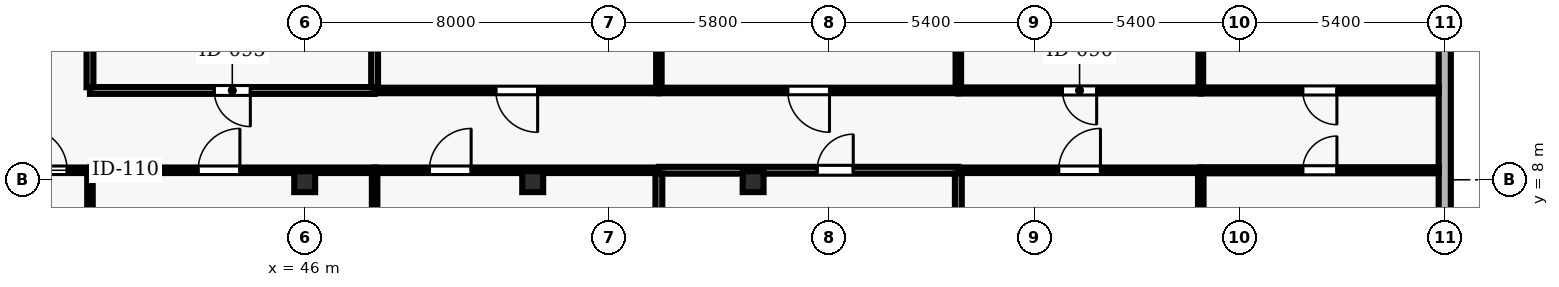
"""IFC4 building model, lengths in metres.
Left out: names, types, materials, properties, quantities, classifications, styles, units other than length and angle.
Written with IfcOpenShell. Run it as: python <this file> out.ifc"""

import sys

from ifc_helpers import new_model, si_unit, direction, frame, frame_2d, origin, origin_2d, place, context, subcontext, project, spatial, rectangle, hollow_rectangle, extrude, element, fill, save


model = new_model("IFC4")
c1 = context("Model", 3, precision=1e-05, world=origin(), true_north=direction((0.0, 1.0)))
c2 = subcontext(c1, "Body", "Model", "MODEL_VIEW")
j1 = project(units=[si_unit("LENGTHUNIT", "METRE"), si_unit("PLANEANGLEUNIT", "RADIAN")], contexts=[c1])
p1 = place(None, origin())
s1 = spatial("IfcSite", under=j1, at=p1, CompositionType="ELEMENT")
p2 = place(p1, origin())
s2 = spatial("IfcBuilding", under=s1, at=p2, CompositionType="ELEMENT")
p3 = place(p2, frame((0.0, 0.0, 62.2)))
s3 = spatial("IfcBuildingStorey", under=s2, at=p3, CompositionType="ELEMENT", Elevation=62.2)
for number, where, z_axis, x_axis in (
    (1, (46.0, 7.95, 0.0), (0.0, 0.0, 1.0), (1.0, 0.0, 0.0)),
    (2, (52.0, 7.95, 0.0), (0.0, 0.0, 1.0), (1.0, 0.0, 0.0)),
    (3, (57.8, 7.95, 0.0), (0.0, 0.0, 1.0), (1.0, 0.0, 0.0)),
):
    element("IfcColumn", number, at=place(p3, frame(where, z_axis=z_axis, x_axis=x_axis)), inside=s3, PredefinedType="COLUMN", context=c2, shape_type="SweptSolid", body=[
        extrude(hollow_rectangle(XDim=0.55, YDim=0.55, WallThickness=0.025, at=origin_2d()), origin(), (0.0, 0.0, 1.0), 3.9),
    ])
p4 = place(p3, frame((76.0, 2.5, 0.0), z_axis=(0.0, 0.0, 1.0), x_axis=(0.0, 1.0, 0.0)))
e4 = element("IfcWall", 4, at=p4, inside=s3, PredefinedType="SOLIDWALL", context=c2, shape_type="SweptSolid", body=[
    extrude(rectangle(XDim=11.0, YDim=0.32, at=frame_2d((5.5, 0.0))), origin(), (0.0, 0.0, 1.0), 3.69),
])
p5 = place(p4, frame((1.55, 0.0, 0.9)))
e5 = element("IfcOpeningElement", 5, at=p5, cuts=e4, PredefinedType="OPENING", context=c2, shape_type="SweptSolid", body=[
    extrude(rectangle(XDim=2.4, YDim=1.6, at=frame_2d((1.2, 0.8))), frame((0.0, 0.17, 0.0), z_axis=(0.0, -1.0, 0.0), x_axis=(1.0, 0.0, 0.0)), (0.0, 0.0, 1.0), 0.34),
])
p6 = place(p3, frame((38.05, 8.25, 0.0), z_axis=(0.0, 0.0, 1.0), x_axis=(1.0, 0.0, 0.0)))
e6 = element("IfcWall", 6, at=p6, inside=s3, PredefinedType="PARTITIONING", context=c2, shape_type="SweptSolid", body=[
    extrude(rectangle(XDim=2.3, YDim=0.145, at=frame_2d((1.15, 0.0))), origin(), (0.0, 0.0, 1.0), 2.995),
])
p7 = place(p6, frame((0.6, 0.0, 0.0)))
e7 = element("IfcOpeningElement", 7, at=p7, cuts=e6, PredefinedType="OPENING", context=c2, shape_type="SweptSolid", body=[
    extrude(rectangle(XDim=1.1, YDim=2.15, at=frame_2d((0.55, 1.075))), frame((0.0, 0.083, 0.0), z_axis=(0.0, -1.0, 0.0), x_axis=(1.0, 0.0, 0.0)), (0.0, 0.0, 1.0), 0.165),
])
p8 = place(p3, frame((40.35, 8.25, 0.0), z_axis=(0.0, 0.0, 1.0), x_axis=(1.0, 0.0, 0.0)))
e8 = element("IfcWall", 8, at=p8, inside=s3, PredefinedType="PARTITIONING", context=c2, shape_type="SweptSolid", body=[
    extrude(rectangle(XDim=7.49, YDim=0.145, at=frame_2d((3.745, 0.0))), origin(), (0.0, 0.0, 1.0), 2.995),
])
p9 = place(p8, frame((2.845, 0.0, 0.0)))
e9 = element("IfcOpeningElement", 9, at=p9, cuts=e8, PredefinedType="OPENING", context=c2, shape_type="SweptSolid", body=[
    extrude(rectangle(XDim=1.1, YDim=2.15, at=frame_2d((0.55, 1.075))), frame((0.0, 0.083, 0.0), z_axis=(0.0, -1.0, 0.0), x_axis=(1.0, 0.0, 0.0)), (0.0, 0.0, 1.0), 0.165),
])
p10 = place(p3, frame((47.84, 8.25, 0.0), z_axis=(0.0, 0.0, 1.0), x_axis=(1.0, 0.0, 0.0)))
e10 = element("IfcWall", 10, at=p10, inside=s3, PredefinedType="PARTITIONING", context=c2, shape_type="SweptSolid", body=[
    extrude(rectangle(XDim=7.48, YDim=0.145, at=frame_2d((3.74, 0.0))), origin(), (0.0, 0.0, 1.0), 2.995),
])
p11 = place(p10, frame((1.44, 0.0, 0.0)))
e11 = element("IfcOpeningElement", 11, at=p11, cuts=e10, PredefinedType="OPENING", context=c2, shape_type="SweptSolid", body=[
    extrude(rectangle(XDim=1.1, YDim=2.15, at=frame_2d((0.55, 1.075))), frame((0.0, 0.083, 0.0), z_axis=(0.0, -1.0, 0.0), x_axis=(1.0, 0.0, 0.0)), (0.0, 0.0, 1.0), 0.165),
])
p12 = place(p3, frame((47.84, 10.35, 0.0), z_axis=(0.0, 0.0, 1.0), x_axis=(-1.0, 0.0, 0.0)))
e12 = element("IfcWall", 12, at=p12, inside=s3, PredefinedType="PARTITIONING", context=c2, shape_type="SweptSolid", body=[
    extrude(rectangle(XDim=7.49, YDim=0.18, at=frame_2d((3.745, 0.0))), origin(), (0.0, 0.0, 1.0), 3.227),
])
p13 = place(p12, frame((3.27, 0.0, 0.0)))
e13 = element("IfcOpeningElement", 13, at=p13, cuts=e12, PredefinedType="OPENING", context=c2, shape_type="SweptSolid", body=[
    extrude(rectangle(XDim=0.95, YDim=2.1, at=frame_2d((0.475, 1.05))), frame((0.0, 0.1, 0.0), z_axis=(0.0, -1.0, 0.0), x_axis=(1.0, 0.0, 0.0)), (0.0, 0.0, 1.0), 0.2),
])
p14 = place(p3, frame((55.32, 8.25, 0.0), z_axis=(0.0, 0.0, 1.0), x_axis=(1.0, 0.0, 0.0)))
e14 = element("IfcWall", 14, at=p14, inside=s3, PredefinedType="PARTITIONING", context=c2, shape_type="SweptSolid", body=[
    extrude(rectangle(XDim=7.88, YDim=0.18, at=frame_2d((3.94, 0.0))), origin(), (0.0, 0.0, 1.0), 2.995),
])
p15 = place(p14, frame((4.165, 0.0, 0.0)))
e15 = element("IfcOpeningElement", 15, at=p15, cuts=e14, PredefinedType="OPENING", context=c2, shape_type="SweptSolid", body=[
    extrude(rectangle(XDim=0.95, YDim=2.1, at=frame_2d((0.475, 1.05))), frame((0.0, 0.1, 0.0), z_axis=(0.0, -1.0, 0.0), x_axis=(1.0, 0.0, 0.0)), (0.0, 0.0, 1.0), 0.2),
])
p16 = place(p3, frame((55.32, 10.35, 0.0), z_axis=(0.0, 0.0, 1.0), x_axis=(-1.0, 0.0, 0.0)))
e16 = element("IfcWall", 16, at=p16, inside=s3, PredefinedType="PARTITIONING", context=c2, shape_type="SweptSolid", body=[
    extrude(rectangle(XDim=7.48, YDim=0.145, at=frame_2d((3.74, 0.0))), origin(), (0.0, 0.0, 1.0), 3.227),
])
p17 = place(p16, frame((3.19, 0.0, 0.0)))
e17 = element("IfcOpeningElement", 17, at=p17, cuts=e16, PredefinedType="OPENING", context=c2, shape_type="SweptSolid", body=[
    extrude(rectangle(XDim=1.1, YDim=2.15, at=frame_2d((0.55, 1.075))), frame((0.0, 0.083, 0.0), z_axis=(0.0, -1.0, 0.0), x_axis=(1.0, 0.0, 0.0)), (0.0, 0.0, 1.0), 0.165),
])
p18 = place(p3, frame((63.2, 8.25, 0.0), z_axis=(0.0, 0.0, 1.0), x_axis=(1.0, 0.0, 0.0)))
e18 = element("IfcWall", 18, at=p18, inside=s3, PredefinedType="PARTITIONING", context=c2, shape_type="SweptSolid", body=[
    extrude(rectangle(XDim=6.38, YDim=0.145, at=frame_2d((3.19, 0.0))), origin(), (0.0, 0.0, 1.0), 3.69),
])
p19 = place(p18, frame((2.64, 0.0, 0.0)))
e19 = element("IfcOpeningElement", 19, at=p19, cuts=e18, PredefinedType="OPENING", context=c2, shape_type="SweptSolid", body=[
    extrude(rectangle(XDim=1.1, YDim=2.15, at=frame_2d((0.55, 1.075))), frame((0.0, 0.083, 0.0), z_axis=(0.0, -1.0, 0.0), x_axis=(1.0, 0.0, 0.0)), (0.0, 0.0, 1.0), 0.165),
])
p20 = place(p3, frame((63.2, 10.35, 0.0), z_axis=(0.0, 0.0, 1.0), x_axis=(-1.0, 0.0, 0.0)))
e20 = element("IfcWall", 20, at=p20, inside=s3, PredefinedType="PARTITIONING", context=c2, shape_type="SweptSolid", body=[
    extrude(rectangle(XDim=7.88, YDim=0.145, at=frame_2d((3.94, 0.0))), origin(), (0.0, 0.0, 1.0), 3.227),
])
p21 = place(p20, frame((3.39, 0.0, 0.0)))
e21 = element("IfcOpeningElement", 21, at=p21, cuts=e20, PredefinedType="OPENING", context=c2, shape_type="SweptSolid", body=[
    extrude(rectangle(XDim=1.1, YDim=2.15, at=frame_2d((0.55, 1.075))), frame((0.0, 0.083, 0.0), z_axis=(0.0, -1.0, 0.0), x_axis=(1.0, 0.0, 0.0)), (0.0, 0.0, 1.0), 0.165),
])
p22 = place(p3, frame((69.58, 8.25, 0.0), z_axis=(0.0, 0.0, 1.0), x_axis=(1.0, 0.0, 0.0)))
e22 = element("IfcWall", 22, at=p22, inside=s3, PredefinedType="PARTITIONING", context=c2, shape_type="SweptSolid", body=[
    extrude(rectangle(XDim=6.265, YDim=0.16, at=frame_2d((3.132, 0.0))), origin(), (0.0, 0.0, 1.0), 3.69),
])
p23 = place(p22, frame((2.683, 0.0, 0.0)))
e23 = element("IfcOpeningElement", 23, at=p23, cuts=e22, PredefinedType="OPENING", context=c2, shape_type="SweptSolid", body=[
    extrude(rectangle(XDim=0.9, YDim=2.1, at=frame_2d((0.45, 1.05))), frame((0.0, 0.09, 0.0), z_axis=(0.0, -1.0, 0.0), x_axis=(1.0, 0.0, 0.0)), (0.0, 0.0, 1.0), 0.18),
])
p24 = place(p3, frame((69.58, 10.35, 0.0), z_axis=(0.0, 0.0, 1.0), x_axis=(-1.0, 0.0, 0.0)))
e24 = element("IfcWall", 24, at=p24, inside=s3, PredefinedType="PARTITIONING", context=c2, shape_type="SweptSolid", body=[
    extrude(rectangle(XDim=6.38, YDim=0.16, at=frame_2d((3.19, 0.0))), origin(), (0.0, 0.0, 1.0), 3.227),
])
p25 = place(p24, frame((2.74, 0.0, 0.0)))
e25 = element("IfcOpeningElement", 25, at=p25, cuts=e24, PredefinedType="OPENING", context=c2, shape_type="SweptSolid", body=[
    extrude(rectangle(XDim=0.9, YDim=2.1, at=frame_2d((0.45, 1.05))), frame((0.0, 0.09, 0.0), z_axis=(0.0, -1.0, 0.0), x_axis=(1.0, 0.0, 0.0)), (0.0, 0.0, 1.0), 0.18),
])
p26 = place(p3, frame((75.845, 10.35, 0.0), z_axis=(0.0, 0.0, 1.0), x_axis=(-1.0, 0.0, 0.0)))
e26 = element("IfcWall", 26, at=p26, inside=s3, PredefinedType="PARTITIONING", context=c2, shape_type="SweptSolid", body=[
    extrude(rectangle(XDim=6.265, YDim=0.16, at=frame_2d((3.132, 0.0))), origin(), (0.0, 0.0, 1.0), 3.69),
])
p27 = place(p26, frame((2.683, 0.0, 0.0)))
e27 = element("IfcOpeningElement", 27, at=p27, cuts=e26, PredefinedType="OPENING", context=c2, shape_type="SweptSolid", body=[
    extrude(rectangle(XDim=0.9, YDim=2.1, at=frame_2d((0.45, 1.05))), frame((0.0, 0.09, 0.0), z_axis=(0.0, -1.0, 0.0), x_axis=(1.0, 0.0, 0.0)), (0.0, 0.0, 1.0), 0.18),
])
p28 = place(p3, frame((40.35, 0.155, 0.0), z_axis=(0.0, 0.0, 1.0), x_axis=(0.0, 1.0, 0.0)))
e28 = element("IfcWall", 28, at=p28, inside=s3, PredefinedType="PARTITIONING", context=c2, shape_type="SweptSolid", body=[
    extrude(rectangle(XDim=8.027, YDim=0.145, at=frame_2d((4.013, 0.0))), origin(), (0.0, 0.0, 1.0), 3.69),
])
p29 = place(p3, frame((40.35, 10.435, 0.0), z_axis=(0.0, 0.0, 1.0), x_axis=(0.0, 1.0, 0.0)))
e29 = element("IfcWall", 29, at=p29, inside=s3, PredefinedType="PARTITIONING", context=c2, shape_type="SweptSolid", body=[
    extrude(rectangle(XDim=5.48, YDim=0.18, at=frame_2d((2.74, 0.0))), origin(), (0.0, 0.0, 1.0), 3.227),
])
p30 = place(p3, frame((47.84, 0.155, 0.0), z_axis=(0.0, 0.0, 1.0), x_axis=(0.0, 1.0, 0.0)))
e30 = element("IfcWall", 30, at=p30, inside=s3, PredefinedType="PARTITIONING", context=c2, shape_type="SweptSolid", body=[
    extrude(rectangle(XDim=8.027, YDim=0.145, at=frame_2d((4.013, 0.0))), origin(), (0.0, 0.0, 1.0), 3.69),
])
p31 = place(p3, frame((47.84, 10.435, 0.0), z_axis=(0.0, 0.0, 1.0), x_axis=(0.0, 1.0, 0.0)))
e31 = element("IfcWall", 31, at=p31, inside=s3, PredefinedType="PARTITIONING", context=c2, shape_type="SweptSolid", body=[
    extrude(rectangle(XDim=5.48, YDim=0.18, at=frame_2d((2.74, 0.0))), origin(), (0.0, 0.0, 1.0), 3.69),
])
p32 = place(p3, frame((55.32, 0.155, 0.0), z_axis=(0.0, 0.0, 1.0), x_axis=(0.0, 1.0, 0.0)))
e32 = element("IfcWall", 32, at=p32, inside=s3, PredefinedType="PARTITIONING", context=c2, shape_type="SweptSolid", body=[
    extrude(rectangle(XDim=8.01, YDim=0.18, at=frame_2d((4.005, 0.0))), origin(), (0.0, 0.0, 1.0), 3.69),
])
p33 = place(p3, frame((55.32, 10.418, 0.0), z_axis=(0.0, 0.0, 1.0), x_axis=(0.0, 1.0, 0.0)))
e33 = element("IfcWall", 33, at=p33, inside=s3, PredefinedType="PARTITIONING", context=c2, shape_type="SweptSolid", body=[
    extrude(rectangle(XDim=5.427, YDim=0.145, at=frame_2d((2.713, 0.0))), origin(), (0.0, 0.0, 1.0), 3.69),
])
p34 = place(p3, frame((63.2, 0.155, 0.0), z_axis=(0.0, 0.0, 1.0), x_axis=(0.0, 1.0, 0.0)))
e34 = element("IfcWall", 34, at=p34, inside=s3, PredefinedType="PARTITIONING", context=c2, shape_type="SweptSolid", body=[
    extrude(rectangle(XDim=8.01, YDim=0.18, at=frame_2d((4.005, 0.0))), origin(), (0.0, 0.0, 1.0), 2.995),
])
p35 = place(p3, frame((63.2, 10.425, 0.0), z_axis=(0.0, 0.0, 1.0), x_axis=(0.0, 1.0, 0.0)))
e35 = element("IfcWall", 35, at=p35, inside=s3, PredefinedType="PARTITIONING", context=c2, shape_type="SweptSolid", body=[
    extrude(rectangle(XDim=5.42, YDim=0.145, at=frame_2d((2.71, 0.0))), origin(), (0.0, 0.0, 1.0), 2.995),
])
p36 = place(p3, frame((69.58, 0.155, 0.0), z_axis=(0.0, 0.0, 1.0), x_axis=(0.0, 1.0, 0.0)))
e36 = element("IfcWall", 36, at=p36, inside=s3, PredefinedType="PARTITIONING", context=c2, shape_type="SweptSolid", body=[
    extrude(rectangle(XDim=8.02, YDim=0.145, at=frame_2d((4.01, 0.0))), origin(), (0.0, 0.0, 1.0), 3.69),
])
p37 = place(p3, frame((69.58, 10.425, 0.0), z_axis=(0.0, 0.0, 1.0), x_axis=(0.0, 1.0, 0.0)))
e37 = element("IfcWall", 37, at=p37, inside=s3, PredefinedType="PARTITIONING", context=c2, shape_type="SweptSolid", body=[
    extrude(rectangle(XDim=5.42, YDim=0.125, at=frame_2d((2.71, 0.0))), origin(), (0.0, 0.0, 1.0), 3.69),
])
p38 = place(p7, origin())
e38 = element("IfcDoor", 38, at=p38, inside=s3, OperationType="SINGLE_SWING_LEFT", PredefinedType="DOOR", context=c2, shape_type="SweptSolid", body=[
    extrude(rectangle(XDim=1.1, YDim=2.15, at=frame_2d((0.55, 1.075))), frame((0.0, 0.025, 0.0), z_axis=(0.0, -1.0, 0.0), x_axis=(1.0, 0.0, 0.0)), (0.0, 0.0, 1.0), 0.05),
])
fill(e7, e38)
p39 = place(p9, origin())
e39 = element("IfcDoor", 39, at=p39, inside=s3, OperationType="SINGLE_SWING_RIGHT", PredefinedType="DOOR", context=c2, shape_type="SweptSolid", body=[
    extrude(rectangle(XDim=1.1, YDim=2.15, at=frame_2d((0.55, 1.075))), frame((0.0, 0.025, 0.0), z_axis=(0.0, -1.0, 0.0), x_axis=(1.0, 0.0, 0.0)), (0.0, 0.0, 1.0), 0.05),
])
fill(e9, e39)
p40 = place(p13, origin())
e40 = element("IfcDoor", 40, at=p40, inside=s3, OperationType="SINGLE_SWING_LEFT", PredefinedType="DOOR", context=c2, shape_type="SweptSolid", body=[
    extrude(rectangle(XDim=0.95, YDim=2.1, at=frame_2d((0.475, 1.05))), frame((0.0, 0.025, 0.0), z_axis=(0.0, -1.0, 0.0), x_axis=(1.0, 0.0, 0.0)), (0.0, 0.0, 1.0), 0.05),
])
fill(e13, e40)
p41 = place(p11, origin())
e41 = element("IfcDoor", 41, at=p41, inside=s3, OperationType="SINGLE_SWING_RIGHT", PredefinedType="DOOR", context=c2, shape_type="SweptSolid", body=[
    extrude(rectangle(XDim=1.1, YDim=2.15, at=frame_2d((0.55, 1.075))), frame((0.0, 0.025, 0.0), z_axis=(0.0, -1.0, 0.0), x_axis=(1.0, 0.0, 0.0)), (0.0, 0.0, 1.0), 0.05),
])
fill(e11, e41)
p42 = place(p17, origin())
e42 = element("IfcDoor", 42, at=p42, inside=s3, OperationType="SINGLE_SWING_LEFT", PredefinedType="DOOR", context=c2, shape_type="SweptSolid", body=[
    extrude(rectangle(XDim=1.1, YDim=2.15, at=frame_2d((0.55, 1.075))), frame((0.0, 0.025, 0.0), z_axis=(0.0, -1.0, 0.0), x_axis=(1.0, 0.0, 0.0)), (0.0, 0.0, 1.0), 0.05),
])
fill(e17, e42)
p43 = place(p15, origin())
e43 = element("IfcDoor", 43, at=p43, inside=s3, OperationType="SINGLE_SWING_RIGHT", PredefinedType="DOOR", context=c2, shape_type="SweptSolid", body=[
    extrude(rectangle(XDim=0.95, YDim=2.1, at=frame_2d((0.475, 1.05))), frame((0.0, 0.025, 0.0), z_axis=(0.0, -1.0, 0.0), x_axis=(1.0, 0.0, 0.0)), (0.0, 0.0, 1.0), 0.05),
])
fill(e15, e43)
p44 = place(p21, origin())
e44 = element("IfcDoor", 44, at=p44, inside=s3, OperationType="SINGLE_SWING_LEFT", PredefinedType="DOOR", context=c2, shape_type="SweptSolid", body=[
    extrude(rectangle(XDim=1.1, YDim=2.15, at=frame_2d((0.55, 1.075))), frame((0.0, 0.025, 0.0), z_axis=(0.0, -1.0, 0.0), x_axis=(1.0, 0.0, 0.0)), (0.0, 0.0, 1.0), 0.05),
])
fill(e21, e44)
p45 = place(p19, origin())
e45 = element("IfcDoor", 45, at=p45, inside=s3, OperationType="SINGLE_SWING_RIGHT", PredefinedType="DOOR", context=c2, shape_type="SweptSolid", body=[
    extrude(rectangle(XDim=1.1, YDim=2.15, at=frame_2d((0.55, 1.075))), frame((0.0, 0.025, 0.0), z_axis=(0.0, -1.0, 0.0), x_axis=(1.0, 0.0, 0.0)), (0.0, 0.0, 1.0), 0.05),
])
fill(e19, e45)
p46 = place(p25, origin())
e46 = element("IfcDoor", 46, at=p46, inside=s3, OperationType="SINGLE_SWING_LEFT", PredefinedType="DOOR", context=c2, shape_type="SweptSolid", body=[
    extrude(rectangle(XDim=0.9, YDim=2.1, at=frame_2d((0.45, 1.05))), frame((0.0, 0.025, 0.0), z_axis=(0.0, -1.0, 0.0), x_axis=(1.0, 0.0, 0.0)), (0.0, 0.0, 1.0), 0.05),
])
fill(e25, e46)
p47 = place(p23, origin())
e47 = element("IfcDoor", 47, at=p47, inside=s3, OperationType="SINGLE_SWING_RIGHT", PredefinedType="DOOR", context=c2, shape_type="SweptSolid", body=[
    extrude(rectangle(XDim=0.9, YDim=2.1, at=frame_2d((0.45, 1.05))), frame((0.0, 0.025, 0.0), z_axis=(0.0, -1.0, 0.0), x_axis=(1.0, 0.0, 0.0)), (0.0, 0.0, 1.0), 0.05),
])
fill(e23, e47)
p48 = place(p27, origin())
e48 = element("IfcDoor", 48, at=p48, inside=s3, OperationType="SINGLE_SWING_LEFT", PredefinedType="DOOR", context=c2, shape_type="SweptSolid", body=[
    extrude(rectangle(XDim=0.9, YDim=2.1, at=frame_2d((0.45, 1.05))), frame((0.0, 0.025, 0.0), z_axis=(0.0, -1.0, 0.0), x_axis=(1.0, 0.0, 0.0)), (0.0, 0.0, 1.0), 0.05),
])
fill(e27, e48)
save(model, sys.argv[1])
